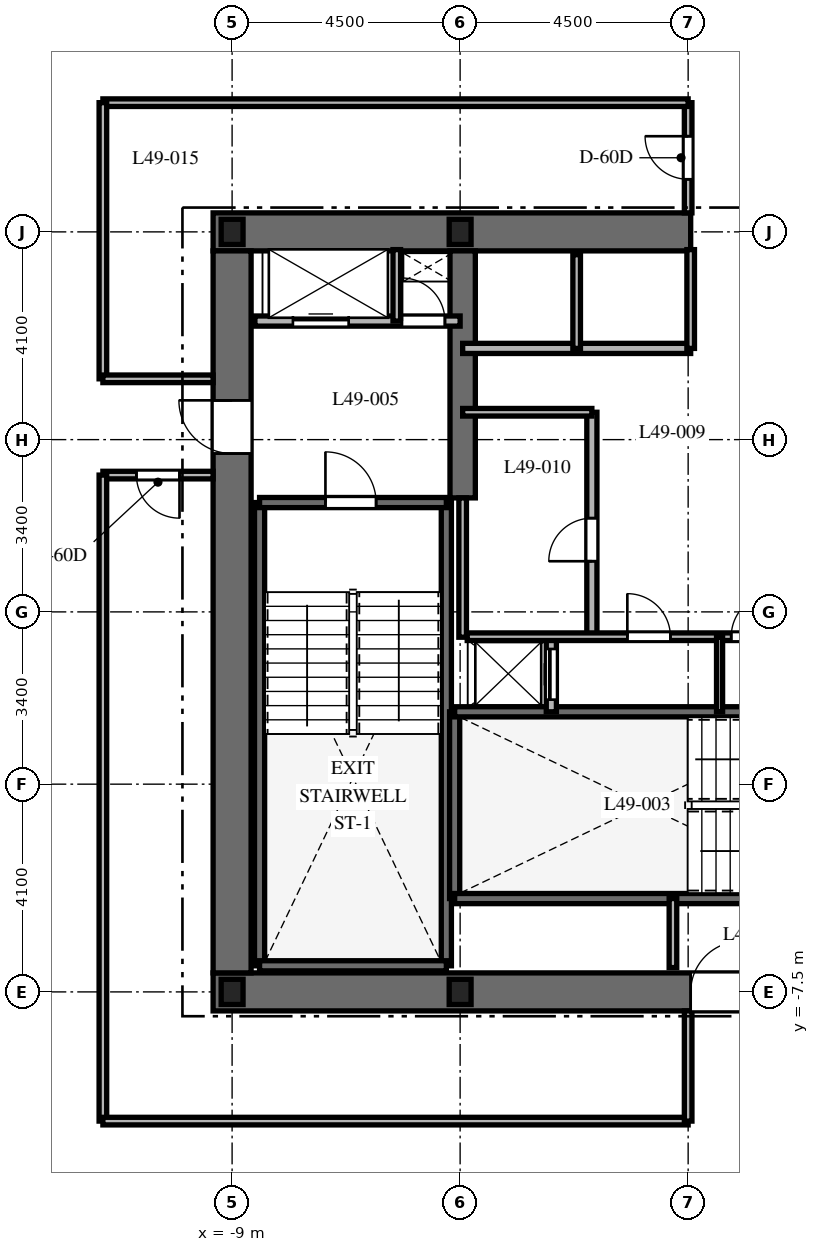
"""IFC4 building model, lengths in metres.
Left out: names, types, materials, properties, quantities, classifications, styles, units other than length and angle.
Written with IfcOpenShell. Run it as: python <this file> out.ifc"""

import sys

from ifc_helpers import new_model, si_unit, direction, frame, frame_2d, origin, origin_2d, place, context, subcontext, project, spatial, rectangle, i_section, extrude, element, fill, save


model = new_model("IFC4")
c1 = context("Model", 3, precision=1e-05, world=origin(), true_north=direction((0.0, 1.0)))
c2 = subcontext(c1, "Body", "Model", "MODEL_VIEW")
j1 = project(units=[si_unit("LENGTHUNIT", "METRE"), si_unit("PLANEANGLEUNIT", "RADIAN")], contexts=[c1])
p1 = place(None, origin())
s1 = spatial("IfcSite", under=j1, at=p1, CompositionType="ELEMENT")
p2 = place(p1, origin())
s2 = spatial("IfcBuilding", under=s1, at=p2, CompositionType="ELEMENT")
p3 = place(p2, frame((0.0, 0.0, 197.8)))
s3 = spatial("IfcBuildingStorey", under=s2, at=p3, CompositionType="ELEMENT", Elevation=197.8)
p4 = place(p3, frame((-9.375, -7.5, 0.0), z_axis=(0.0, 0.0, 1.0), x_axis=(1.0, 0.0, 0.0)))
e1 = element("IfcWall", 1, at=p4, inside=s3, PredefinedType="SHEAR", context=c2, shape_type="SweptSolid", body=[
    extrude(rectangle(XDim=18.75, YDim=0.75, at=frame_2d((9.375, 0.0))), origin(), (0.0, 0.0, 1.0), 3.7),
])
p5 = place(p4, frame((9.425, 0.0, 0.0)))
e2 = element("IfcOpeningElement", 2, at=p5, cuts=e1, PredefinedType="OPENING", context=c2, shape_type="SweptSolid", body=[
    extrude(rectangle(XDim=1.0, YDim=2.15, at=frame_2d((0.5, 1.075))), frame((0.0, 0.385, 0.0), z_axis=(0.0, -1.0, 0.0), x_axis=(1.0, 0.0, 0.0)), (0.0, 0.0, 1.0), 0.77),
])
p6 = place(p3, frame((-9.375, 7.5, 0.0), z_axis=(0.0, 0.0, 1.0), x_axis=(1.0, 0.0, 0.0)))
e3 = element("IfcWall", 3, at=p6, inside=s3, PredefinedType="SHEAR", context=c2, shape_type="SweptSolid", body=[
    extrude(rectangle(XDim=9.425, YDim=0.75, at=frame_2d((4.712, 0.0))), origin(), (0.0, 0.0, 1.0), 3.7),
])
p7 = place(p3, frame((-9.0, -7.125, 0.0), z_axis=(0.0, 0.0, 1.0), x_axis=(0.0, 1.0, 0.0)))
e4 = element("IfcWall", 4, at=p7, inside=s3, PredefinedType="SHEAR", context=c2, shape_type="SweptSolid", body=[
    extrude(rectangle(XDim=14.25, YDim=0.75, at=frame_2d((7.125, 0.0))), origin(), (0.0, 0.0, 1.0), 3.7),
])
p8 = place(p7, frame((10.25, 0.0, 0.0)))
e5 = element("IfcOpeningElement", 5, at=p8, cuts=e4, PredefinedType="OPENING", context=c2, shape_type="SweptSolid", body=[
    extrude(rectangle(XDim=1.05, YDim=2.15, at=frame_2d((0.525, 1.075))), frame((0.0, 0.385, 0.0), z_axis=(0.0, -1.0, 0.0), x_axis=(1.0, 0.0, 0.0)), (0.0, 0.0, 1.0), 0.77),
])
p9 = place(p3, frame((-4.45, 2.25, 0.0), z_axis=(0.0, 0.0, 1.0), x_axis=(0.0, 1.0, 0.0)))
e6 = element("IfcWall", 6, at=p9, inside=s3, PredefinedType="SHEAR", context=c2, shape_type="SweptSolid", body=[
    extrude(rectangle(XDim=4.875, YDim=0.5, at=frame_2d((2.438, 0.0))), origin(), (0.0, 0.0, 1.0), 3.7),
])
for number, where, z_axis, x_axis in (
    (7, (-8.458, -6.985, 0.0), (0.0, 0.0, 1.0), (0.0, 1.0, 0.0)),
    (8, (-4.772, -6.985, 0.0), (0.0, 0.0, 1.0), (0.0, 1.0, 0.0)),
):
    element("IfcWall", number, at=place(p3, frame(where, z_axis=z_axis, x_axis=x_axis)), inside=s3, PredefinedType="SHEAR", context=c2, shape_type="SweptSolid", body=[
        extrude(rectangle(XDim=9.143, YDim=0.2, at=frame_2d((4.572, 0.0))), origin(), (0.0, 0.0, 1.0), 3.7),
    ])
p10 = place(p3, frame((-8.458, -6.985, 0.0), z_axis=(0.0, 0.0, 1.0), x_axis=(1.0, 0.0, 0.0)))
e9 = element("IfcWall", 9, at=p10, inside=s3, PredefinedType="SHEAR", context=c2, shape_type="SweptSolid", body=[
    extrude(rectangle(XDim=3.686, YDim=0.2, at=frame_2d((1.843, 0.0))), origin(), (0.0, 0.0, 1.0), 3.7),
])
p11 = place(p3, frame((-8.458, 2.158, 0.0), z_axis=(0.0, 0.0, 1.0), x_axis=(1.0, 0.0, 0.0)))
e10 = element("IfcWall", 10, at=p11, inside=s3, PredefinedType="SHEAR", context=c2, shape_type="SweptSolid", body=[
    extrude(rectangle(XDim=3.686, YDim=0.2, at=frame_2d((1.843, 0.0))), origin(), (0.0, 0.0, 1.0), 3.7),
])
p12 = place(p11, frame((1.3, 0.0, 0.0)))
e11 = element("IfcOpeningElement", 11, at=p12, cuts=e10, PredefinedType="OPENING", context=c2, shape_type="SweptSolid", body=[
    extrude(rectangle(XDim=1.0, YDim=2.15, at=frame_2d((0.5, 1.075))), frame((0.0, 0.11, 0.0), z_axis=(0.0, -1.0, 0.0), x_axis=(1.0, 0.0, 0.0)), (0.0, 0.0, 1.0), 0.22),
])
p13 = place(p3, frame((-4.608, -5.658, 0.0), z_axis=(0.0, 0.0, 1.0), x_axis=(0.0, 1.0, 0.0)))
e12 = element("IfcWall", 12, at=p13, inside=s3, PredefinedType="SHEAR", context=c2, shape_type="SweptSolid", body=[
    extrude(rectangle(XDim=3.686, YDim=0.2, at=frame_2d((1.843, 0.0))), origin(), (0.0, 0.0, 1.0), 3.7),
])
p14 = place(p3, frame((-4.608, -5.658, 0.0), z_axis=(0.0, 0.0, 1.0), x_axis=(1.0, 0.0, 0.0)))
e13 = element("IfcWall", 13, at=p14, inside=s3, PredefinedType="SHEAR", context=c2, shape_type="SweptSolid", body=[
    extrude(rectangle(XDim=9.166, YDim=0.2, at=frame_2d((4.583, 0.0))), origin(), (0.0, 0.0, 1.0), 3.7),
])
p15 = place(p14, frame((7.45, 0.0, 0.0)))
e14 = element("IfcOpeningElement", 14, at=p15, cuts=e13, PredefinedType="OPENING", context=c2, shape_type="SweptSolid", body=[
    extrude(rectangle(XDim=1.0, YDim=2.15, at=frame_2d((0.5, 1.075))), frame((0.0, 0.11, 0.0), z_axis=(0.0, -1.0, 0.0), x_axis=(1.0, 0.0, 0.0)), (0.0, 0.0, 1.0), 0.22),
])
p16 = place(p3, frame((-4.608, -1.972, 0.0), z_axis=(0.0, 0.0, 1.0), x_axis=(1.0, 0.0, 0.0)))
e15 = element("IfcWall", 15, at=p16, inside=s3, PredefinedType="SHEAR", context=c2, shape_type="SweptSolid", body=[
    extrude(rectangle(XDim=9.166, YDim=0.2, at=frame_2d((4.583, 0.0))), origin(), (0.0, 0.0, 1.0), 3.7),
])
for number, where, z_axis, x_axis in (
    (16, (-9.0, -7.5, 0.0), (0.0, 0.0, 1.0), (1.0, 0.0, 0.0)),
    (17, (-4.5, -7.5, 0.0), (0.0, 0.0, 1.0), (1.0, 0.0, 0.0)),
    (18, (-4.5, 7.5, 0.0), (0.0, 0.0, 1.0), (1.0, 0.0, 0.0)),
    (19, (-9.0, 7.5, 0.0), (0.0, 0.0, 1.0), (1.0, 0.0, 0.0)),
):
    element("IfcColumn", number, at=place(p3, frame(where, z_axis=z_axis, x_axis=x_axis)), inside=s3, PredefinedType="COLUMN", context=c2, shape_type="SweptSolid", body=[
        extrude(i_section(OverallWidth=0.432, OverallDepth=0.498, WebThickness=0.056, FlangeThickness=0.089, at=origin_2d()), origin(), (0.0, 0.0, 1.0), 3.7),
    ])
p17 = place(p3, frame((-0.3, -7.02, 0.0), z_axis=(0.0, 0.0, 1.0), x_axis=(0.0, 1.0, 0.0)))
e20 = element("IfcWall", 20, at=p17, inside=s3, PredefinedType="PARTITIONING", context=c2, shape_type="SweptSolid", body=[
    extrude(rectangle(XDim=1.362, YDim=0.15, at=frame_2d((0.681, 0.0))), origin(), (0.0, 0.0, 1.0), 3.35),
])
p18 = place(p3, frame((-8.55, 5.74, 0.0), z_axis=(0.0, 0.0, 1.0), x_axis=(1.0, 0.0, 0.0)))
e21 = element("IfcWall", 21, at=p18, inside=s3, PredefinedType="PARTITIONING", context=c2, shape_type="SweptSolid", body=[
    extrude(rectangle(XDim=4.05, YDim=0.2, at=frame_2d((2.025, 0.0))), origin(), (0.0, 0.0, 1.0), 3.35),
])
p19 = place(p18, frame((0.75, 0.0, 0.0)))
e22 = element("IfcOpeningElement", 22, at=p19, cuts=e21, PredefinedType="OPENING", context=c2, shape_type="SweptSolid", body=[
    extrude(rectangle(XDim=1.1, YDim=2.2, at=frame_2d((0.55, 1.1))), frame((0.0, 0.11, 0.0), z_axis=(0.0, -1.0, 0.0), x_axis=(1.0, 0.0, 0.0)), (0.0, 0.0, 1.0), 0.22),
])
p20 = place(p18, frame((2.9, 0.0, 0.0)))
e23 = element("IfcOpeningElement", 23, at=p20, cuts=e21, PredefinedType="OPENING", context=c2, shape_type="SweptSolid", body=[
    extrude(rectangle(XDim=0.85, YDim=2.03, at=frame_2d((0.425, 1.015))), frame((0.0, 0.11, 0.0), z_axis=(0.0, -1.0, 0.0), x_axis=(1.0, 0.0, 0.0)), (0.0, 0.0, 1.0), 0.22),
])
p21 = place(p3, frame((-5.75, 5.74, 0.0), z_axis=(0.0, 0.0, 1.0), x_axis=(0.0, 1.0, 0.0)))
e24 = element("IfcWall", 24, at=p21, inside=s3, PredefinedType="PARTITIONING", context=c2, shape_type="SweptSolid", body=[
    extrude(rectangle(XDim=1.41, YDim=0.15, at=frame_2d((0.705, 0.0))), origin(), (0.0, 0.0, 1.0), 3.35),
])
p22 = place(p3, frame((-2.7, -1.972, 0.0), z_axis=(0.0, 0.0, 1.0), x_axis=(0.0, 1.0, 0.0)))
e25 = element("IfcWall", 25, at=p22, inside=s3, PredefinedType="PARTITIONING", context=c2, shape_type="SweptSolid", body=[
    extrude(rectangle(XDim=1.472, YDim=0.2, at=frame_2d((0.736, 0.0))), origin(), (0.0, 0.0, 1.0), 3.35),
])
p23 = place(p22, frame((0.24, 0.0, 0.0)))
e26 = element("IfcOpeningElement", 26, at=p23, cuts=e25, PredefinedType="OPENING", context=c2, shape_type="SweptSolid", body=[
    extrude(rectangle(XDim=1.0, YDim=2.2, at=frame_2d((0.5, 1.1))), frame((0.0, 0.11, 0.0), z_axis=(0.0, -1.0, 0.0), x_axis=(1.0, 0.0, 0.0)), (0.0, 0.0, 1.0), 0.22),
])
p24 = place(p3, frame((-4.45, 5.2, 0.0), z_axis=(0.0, 0.0, 1.0), x_axis=(1.0, 0.0, 0.0)))
e27 = element("IfcWall", 27, at=p24, inside=s3, PredefinedType="PARTITIONING", context=c2, shape_type="SweptSolid", body=[
    extrude(rectangle(XDim=4.5, YDim=0.2, at=frame_2d((2.25, 0.0))), origin(), (0.0, 0.0, 1.0), 3.35),
])
p25 = place(p3, frame((-2.2, 5.2, 0.0), z_axis=(0.0, 0.0, 1.0), x_axis=(0.0, 1.0, 0.0)))
e28 = element("IfcWall", 28, at=p25, inside=s3, PredefinedType="PARTITIONING", context=c2, shape_type="SweptSolid", body=[
    extrude(rectangle(XDim=1.85, YDim=0.15, at=frame_2d((0.925, 0.0))), origin(), (0.0, 0.0, 1.0), 3.35),
])
p26 = place(p3, frame((0.05, 5.2, 0.0), z_axis=(0.0, 0.0, 1.0), x_axis=(0.0, 1.0, 0.0)))
e29 = element("IfcWall", 29, at=p26, inside=s3, PredefinedType="PARTITIONING", context=c2, shape_type="SweptSolid", body=[
    extrude(rectangle(XDim=1.95, YDim=0.15, at=frame_2d((0.975, 0.0))), origin(), (0.0, 0.0, 1.0), 3.35),
])
p27 = place(p3, frame((-4.45, -0.5, 0.0), z_axis=(0.0, 0.0, 1.0), x_axis=(0.0, 1.0, 0.0)))
e30 = element("IfcWall", 30, at=p27, inside=s3, PredefinedType="PARTITIONING", context=c2, shape_type="SweptSolid", body=[
    extrude(rectangle(XDim=2.75, YDim=0.15, at=frame_2d((1.375, 0.0))), origin(), (0.0, 0.0, 1.0), 3.35),
])
p28 = place(p3, frame((-1.9, -0.5, 0.0), z_axis=(0.0, 0.0, 1.0), x_axis=(0.0, 1.0, 0.0)))
e31 = element("IfcWall", 31, at=p28, inside=s3, PredefinedType="PARTITIONING", context=c2, shape_type="SweptSolid", body=[
    extrude(rectangle(XDim=4.44, YDim=0.2, at=frame_2d((2.22, 0.0))), origin(), (0.0, 0.0, 1.0), 3.35),
])
p29 = place(p28, frame((1.5, 0.0, 0.0)))
e32 = element("IfcOpeningElement", 32, at=p29, cuts=e31, PredefinedType="OPENING", context=c2, shape_type="SweptSolid", body=[
    extrude(rectangle(XDim=0.85, YDim=2.03, at=frame_2d((0.425, 1.015))), frame((0.0, 0.11, 0.0), z_axis=(0.0, -1.0, 0.0), x_axis=(1.0, 0.0, 0.0)), (0.0, 0.0, 1.0), 0.22),
])
p30 = place(p3, frame((-4.45, 3.94, 0.0), z_axis=(0.0, 0.0, 1.0), x_axis=(1.0, 0.0, 0.0)))
e33 = element("IfcWall", 33, at=p30, inside=s3, PredefinedType="PARTITIONING", context=c2, shape_type="SweptSolid", body=[
    extrude(rectangle(XDim=2.55, YDim=0.15, at=frame_2d((1.275, 0.0))), origin(), (0.0, 0.0, 1.0), 3.35),
])
p31 = place(p3, frame((-4.36, -0.49, 0.0), z_axis=(0.0, 0.0, 1.0), x_axis=(1.0, 0.0, 0.0)))
e34 = element("IfcWall", 34, at=p31, inside=s3, PredefinedType="PARTITIONING", context=c2, shape_type="SweptSolid", body=[
    extrude(rectangle(XDim=8.72, YDim=0.15, at=frame_2d((4.36, 0.0))), origin(), (0.0, 0.0, 1.0), 3.35),
])
p32 = place(p31, frame((3.16, 0.0, 0.0)))
e35 = element("IfcOpeningElement", 35, at=p32, cuts=e34, PredefinedType="OPENING", context=c2, shape_type="SweptSolid", body=[
    extrude(rectangle(XDim=0.85, YDim=2.03, at=frame_2d((0.425, 1.015))), frame((0.0, 0.085, 0.0), z_axis=(0.0, -1.0, 0.0), x_axis=(1.0, 0.0, 0.0)), (0.0, 0.0, 1.0), 0.17),
])
p33 = place(p31, frame((5.21, 0.0, 0.0)))
e36 = element("IfcOpeningElement", 36, at=p33, cuts=e34, PredefinedType="OPENING", context=c2, shape_type="SweptSolid", body=[
    extrude(rectangle(XDim=0.85, YDim=2.03, at=frame_2d((0.425, 1.015))), frame((0.0, 0.085, 0.0), z_axis=(0.0, -1.0, 0.0), x_axis=(1.0, 0.0, 0.0)), (0.0, 0.0, 1.0), 0.17),
])
p34 = place(p3, frame((0.62, -1.972, 0.0), z_axis=(0.0, 0.0, 1.0), x_axis=(0.0, 1.0, 0.0)))
e37 = element("IfcWall", 37, at=p34, inside=s3, PredefinedType="PARTITIONING", context=c2, shape_type="SweptSolid", body=[
    extrude(rectangle(XDim=1.472, YDim=0.12, at=frame_2d((0.736, 0.0))), origin(), (0.0, 0.0, 1.0), 3.35),
])
p35 = place(p3, frame((0.0, 7.875, 0.0), z_axis=(0.0, 0.0, 1.0), x_axis=(0.0, 1.0, 0.0)))
e38 = element("IfcWall", 38, at=p35, inside=s3, PredefinedType="PARTITIONING", context=c2, shape_type="SweptSolid", body=[
    extrude(rectangle(XDim=2.175, YDim=0.15, at=frame_2d((1.087, 0.0))), origin(), (0.0, 0.0, 1.0), 3.35),
])
p36 = place(p35, frame((0.663, 0.0, 0.0)))
e39 = element("IfcOpeningElement", 39, at=p36, cuts=e38, PredefinedType="OPENING", context=c2, shape_type="SweptSolid", body=[
    extrude(rectangle(XDim=0.85, YDim=2.03, at=frame_2d((0.425, 1.015))), frame((0.0, 0.085, 0.0), z_axis=(0.0, -1.0, 0.0), x_axis=(1.0, 0.0, 0.0)), (0.0, 0.0, 1.0), 0.17),
])
p37 = place(p3, frame((0.0, 10.05, 0.0), z_axis=(0.0, 0.0, 1.0), x_axis=(-1.0, 0.0, 0.0)))
e40 = element("IfcWall", 40, at=p37, inside=s3, PredefinedType="PARTITIONING", context=c2, shape_type="SweptSolid", body=[
    extrude(rectangle(XDim=11.55, YDim=0.15, at=frame_2d((5.775, 0.0))), origin(), (0.0, 0.0, 1.0), 2.79),
])
p38 = place(p3, frame((-11.55, 10.05, 0.0), z_axis=(0.0, 0.0, 1.0), x_axis=(0.0, -1.0, 0.0)))
e41 = element("IfcWall", 41, at=p38, inside=s3, PredefinedType="PARTITIONING", context=c2, shape_type="SweptSolid", body=[
    extrude(rectangle(XDim=5.45, YDim=0.15, at=frame_2d((2.725, 0.0))), origin(), (0.0, 0.0, 1.0), 2.79),
])
p39 = place(p3, frame((-11.55, 4.6, 0.0), z_axis=(0.0, 0.0, 1.0), x_axis=(1.0, 0.0, 0.0)))
e42 = element("IfcWall", 42, at=p39, inside=s3, PredefinedType="PARTITIONING", context=c2, shape_type="SweptSolid", body=[
    extrude(rectangle(XDim=2.175, YDim=0.15, at=frame_2d((1.087, 0.0))), origin(), (0.0, 0.0, 1.0), 3.35),
])
p40 = place(p3, frame((-9.375, 2.7, 0.0), z_axis=(0.0, 0.0, 1.0), x_axis=(-1.0, 0.0, 0.0)))
e43 = element("IfcWall", 43, at=p40, inside=s3, PredefinedType="PARTITIONING", context=c2, shape_type="SweptSolid", body=[
    extrude(rectangle(XDim=2.175, YDim=0.15, at=frame_2d((1.087, 0.0))), origin(), (0.0, 0.0, 1.0), 3.35),
])
p41 = place(p40, frame((0.663, 0.0, 0.0)))
e44 = element("IfcOpeningElement", 44, at=p41, cuts=e43, PredefinedType="OPENING", context=c2, shape_type="SweptSolid", body=[
    extrude(rectangle(XDim=0.85, YDim=2.03, at=frame_2d((0.425, 1.015))), frame((0.0, 0.085, 0.0), z_axis=(0.0, -1.0, 0.0), x_axis=(1.0, 0.0, 0.0)), (0.0, 0.0, 1.0), 0.17),
])
p42 = place(p3, frame((-11.55, 2.7, 0.0), z_axis=(0.0, 0.0, 1.0), x_axis=(0.0, -1.0, 0.0)))
e45 = element("IfcWall", 45, at=p42, inside=s3, PredefinedType="PARTITIONING", context=c2, shape_type="SweptSolid", body=[
    extrude(rectangle(XDim=12.75, YDim=0.15, at=frame_2d((6.375, 0.0))), origin(), (0.0, 0.0, 1.0), 2.79),
])
p43 = place(p3, frame((-11.55, -10.05, 0.0), z_axis=(0.0, 0.0, 1.0), x_axis=(1.0, 0.0, 0.0)))
e46 = element("IfcWall", 46, at=p43, inside=s3, PredefinedType="PARTITIONING", context=c2, shape_type="SweptSolid", body=[
    extrude(rectangle(XDim=11.55, YDim=0.15, at=frame_2d((5.775, 0.0))), origin(), (0.0, 0.0, 1.0), 2.14),
])
p44 = place(p3, frame((0.0, -10.05, 0.0), z_axis=(0.0, 0.0, 1.0), x_axis=(0.0, 1.0, 0.0)))
e47 = element("IfcWall", 47, at=p44, inside=s3, PredefinedType="PARTITIONING", context=c2, shape_type="SweptSolid", body=[
    extrude(rectangle(XDim=2.175, YDim=0.15, at=frame_2d((1.087, 0.0))), origin(), (0.0, 0.0, 1.0), 3.35),
])
p45 = place(p12, origin())
e48 = element("IfcDoor", 48, at=p45, inside=s3, OperationType="SINGLE_SWING_LEFT", PredefinedType="DOOR", context=c2, shape_type="SweptSolid", body=[
    extrude(rectangle(XDim=1.0, YDim=2.15, at=frame_2d((0.5, 1.075))), frame((0.0, 0.025, 0.0), z_axis=(0.0, -1.0, 0.0), x_axis=(1.0, 0.0, 0.0)), (0.0, 0.0, 1.0), 0.05),
])
fill(e11, e48)
p46 = place(p5, origin())
e49 = element("IfcDoor", 49, at=p46, inside=s3, OperationType="SINGLE_SWING_RIGHT", PredefinedType="DOOR", context=c2, shape_type="SweptSolid", body=[
    extrude(rectangle(XDim=1.0, YDim=2.15, at=frame_2d((0.5, 1.075))), frame((0.0, 0.025, 0.0), z_axis=(0.0, -1.0, 0.0), x_axis=(1.0, 0.0, 0.0)), (0.0, 0.0, 1.0), 0.05),
])
fill(e2, e49)
p47 = place(p8, origin())
e50 = element("IfcDoor", 50, at=p47, inside=s3, OperationType="SINGLE_SWING_RIGHT", PredefinedType="DOOR", context=c2, shape_type="SweptSolid", body=[
    extrude(rectangle(XDim=1.05, YDim=2.15, at=frame_2d((0.525, 1.075))), frame((0.0, 0.025, 0.0), z_axis=(0.0, -1.0, 0.0), x_axis=(1.0, 0.0, 0.0)), (0.0, 0.0, 1.0), 0.05),
])
fill(e5, e50)
p48 = place(p19, origin())
e51 = element("IfcDoor", 51, at=p48, inside=s3, OperationType="SLIDING_TO_LEFT", PredefinedType="DOOR", context=c2, shape_type="SweptSolid", body=[
    extrude(rectangle(XDim=1.1, YDim=2.2, at=frame_2d((0.55, 1.1))), frame((0.0, 0.025, 0.0), z_axis=(0.0, -1.0, 0.0), x_axis=(1.0, 0.0, 0.0)), (0.0, 0.0, 1.0), 0.05),
])
fill(e22, e51)
p49 = place(p20, origin())
e52 = element("IfcDoor", 52, at=p49, inside=s3, OperationType="SINGLE_SWING_LEFT", PredefinedType="DOOR", context=c2, shape_type="SweptSolid", body=[
    extrude(rectangle(XDim=0.85, YDim=2.03, at=frame_2d((0.425, 1.015))), frame((0.0, 0.025, 0.0), z_axis=(0.0, -1.0, 0.0), x_axis=(1.0, 0.0, 0.0)), (0.0, 0.0, 1.0), 0.05),
])
fill(e23, e52)
p50 = place(p23, origin())
e53 = element("IfcDoor", 53, at=p50, inside=s3, OperationType="SLIDING_TO_LEFT", PredefinedType="DOOR", context=c2, shape_type="SweptSolid", body=[
    extrude(rectangle(XDim=1.0, YDim=2.2, at=frame_2d((0.5, 1.1))), frame((0.0, 0.025, 0.0), z_axis=(0.0, -1.0, 0.0), x_axis=(1.0, 0.0, 0.0)), (0.0, 0.0, 1.0), 0.05),
])
fill(e26, e53)
p51 = place(p29, origin())
e54 = element("IfcDoor", 54, at=p51, inside=s3, OperationType="SINGLE_SWING_LEFT", PredefinedType="DOOR", context=c2, shape_type="SweptSolid", body=[
    extrude(rectangle(XDim=0.85, YDim=2.03, at=frame_2d((0.425, 1.015))), frame((0.0, 0.025, 0.0), z_axis=(0.0, -1.0, 0.0), x_axis=(1.0, 0.0, 0.0)), (0.0, 0.0, 1.0), 0.05),
])
fill(e32, e54)
p52 = place(p32, origin())
e55 = element("IfcDoor", 55, at=p52, inside=s3, OperationType="SINGLE_SWING_LEFT", PredefinedType="DOOR", context=c2, shape_type="SweptSolid", body=[
    extrude(rectangle(XDim=0.85, YDim=2.03, at=frame_2d((0.425, 1.015))), frame((0.0, 0.025, 0.0), z_axis=(0.0, -1.0, 0.0), x_axis=(1.0, 0.0, 0.0)), (0.0, 0.0, 1.0), 0.05),
])
fill(e35, e55)
p53 = place(p33, origin())
e56 = element("IfcDoor", 56, at=p53, inside=s3, OperationType="SINGLE_SWING_RIGHT", PredefinedType="DOOR", context=c2, shape_type="SweptSolid", body=[
    extrude(rectangle(XDim=0.85, YDim=2.03, at=frame_2d((0.425, 1.015))), frame((0.0, 0.025, 0.0), z_axis=(0.0, -1.0, 0.0), x_axis=(1.0, 0.0, 0.0)), (0.0, 0.0, 1.0), 0.05),
])
fill(e36, e56)
p54 = place(p41, origin())
e57 = element("IfcDoor", 57, at=p54, inside=s3, OperationType="SINGLE_SWING_LEFT", PredefinedType="DOOR", context=c2, shape_type="SweptSolid", body=[
    extrude(rectangle(XDim=0.85, YDim=2.03, at=frame_2d((0.425, 1.015))), frame((0.0, 0.025, 0.0), z_axis=(0.0, -1.0, 0.0), x_axis=(1.0, 0.0, 0.0)), (0.0, 0.0, 1.0), 0.05),
])
fill(e44, e57)
p55 = place(p36, origin())
e58 = element("IfcDoor", 58, at=p55, inside=s3, OperationType="SINGLE_SWING_RIGHT", PredefinedType="DOOR", context=c2, shape_type="SweptSolid", body=[
    extrude(rectangle(XDim=0.85, YDim=2.03, at=frame_2d((0.425, 1.015))), frame((0.0, 0.025, 0.0), z_axis=(0.0, -1.0, 0.0), x_axis=(1.0, 0.0, 0.0)), (0.0, 0.0, 1.0), 0.05),
])
fill(e39, e58)
save(model, sys.argv[1])
